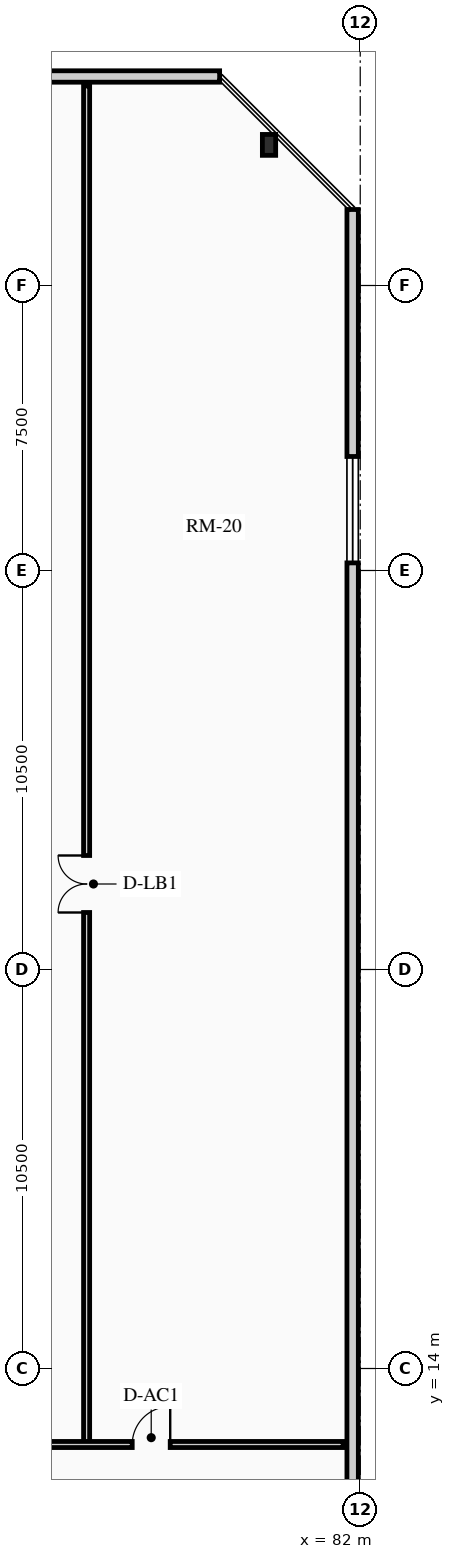
"""IFC4 building model, lengths in metres.
Left out: names, types, materials, properties, quantities, classifications, styles, units other than length and angle.
Written with IfcOpenShell. Run it as: python <this file> out.ifc"""

import sys

from ifc_helpers import new_model, si_unit, direction, frame, frame_2d, origin, origin_2d, place, context, subcontext, project, spatial, rectangle, hollow_rectangle, extrude, source, transform, mapped, element, fill, save


model = new_model("IFC4")
c1 = context("Model", 3, precision=1e-05, world=origin(), true_north=direction((0.0, 1.0)))
c2 = subcontext(c1, "Body", "Model", "MODEL_VIEW")
j1 = project(units=[si_unit("LENGTHUNIT", "METRE"), si_unit("PLANEANGLEUNIT", "RADIAN")], contexts=[c1])
p1 = place(None, origin())
s1 = spatial("IfcSite", under=j1, at=p1, CompositionType="ELEMENT")
p2 = place(p1, origin())
s2 = spatial("IfcBuilding", under=s1, at=p2, CompositionType="ELEMENT")
p3 = place(p2, frame((0.0, 0.0, 4.8)))
s3 = spatial("IfcBuildingStorey", under=s2, at=p3, CompositionType="ELEMENT", Elevation=4.8)
p4 = place(p3, frame((79.6, 46.2, 0.0), z_axis=(0.0, 0.0, 1.0), x_axis=(1.0, 0.0, 0.0)))
e1 = element("IfcColumn", 1, at=p4, inside=s3, PredefinedType="PILASTER", context=c2, shape_type="SweptSolid", body=[
    extrude(hollow_rectangle(XDim=0.35, YDim=0.55, WallThickness=0.022, at=origin_2d()), origin(), (0.0, 0.0, 1.0), 4.2),
])
p5 = place(p3, frame((3.8, 48.0, 0.0), z_axis=(0.0, 0.0, 1.0), x_axis=(1.0, 0.0, 0.0)))
e2 = element("IfcWall", 2, at=p5, inside=s3, PredefinedType="SOLIDWALL", context=c2, shape_type="SweptSolid", body=[
    extrude(rectangle(XDim=74.5, YDim=0.3, at=frame_2d((37.25, 0.0))), origin(), (0.0, 0.0, 1.0), 3.885),
])
m1 = source(origin(), c2, "Body", "SweptSolid", [
    extrude(rectangle(XDim=2.8, YDim=2.1, at=frame_2d((1.4, 1.05))), frame((0.0, 0.16, 0.0), z_axis=(0.0, -1.0, 0.0), x_axis=(1.0, 0.0, 0.0)), (0.0, 0.0, 1.0), 0.32),
])
p6 = place(p5, frame((6.5, 0.0, 0.8)))
e3 = element("IfcOpeningElement", 3, at=p6, cuts=e2, PredefinedType="OPENING", context=c2, shape_type="MappedRepresentation", body=[
    mapped(m1, transform((0.0, 0.0, 0.0), x_axis=(1.0, 0.0, 0.0), y_axis=(0.0, 1.0, 0.0), z_axis=(0.0, 0.0, 1.0), scale=1.0)),
])
p7 = place(p5, frame((39.5, 0.0, 0.8)))
e4 = element("IfcOpeningElement", 4, at=p7, cuts=e2, PredefinedType="OPENING", context=c2, shape_type="MappedRepresentation", body=[
    mapped(m1, transform((0.0, 0.0, 0.0), x_axis=(1.0, 0.0, 0.0), y_axis=(0.0, 1.0, 0.0), z_axis=(0.0, 0.0, 1.0), scale=1.0)),
])
p8 = place(p3, frame((81.8, 44.5, 0.0), z_axis=(0.0, 0.0, 1.0), x_axis=(0.0, -1.0, 0.0)))
e5 = element("IfcWall", 5, at=p8, inside=s3, PredefinedType="SOLIDWALL", context=c2, shape_type="SweptSolid", body=[
    extrude(rectangle(XDim=40.0, YDim=0.3, at=frame_2d((20.0, 0.0))), origin(), (0.0, 0.0, 1.0), 3.885),
])
p9 = place(p8, frame((6.5, 0.0, 0.8)))
e6 = element("IfcOpeningElement", 6, at=p9, cuts=e5, PredefinedType="OPENING", context=c2, shape_type="MappedRepresentation", body=[
    mapped(m1, transform((0.0, 0.0, 0.0), x_axis=(1.0, 0.0, 0.0), y_axis=(0.0, 1.0, 0.0), z_axis=(0.0, 0.0, 1.0), scale=1.0)),
])
p10 = place(p3, frame((74.8, 12.0, 0.0), z_axis=(0.0, 0.0, 1.0), x_axis=(0.0, 1.0, 0.0)))
e7 = element("IfcWall", 7, at=p10, inside=s3, PredefinedType="PARTITIONING", context=c2, shape_type="SweptSolid", body=[
    extrude(rectangle(XDim=35.75, YDim=0.16, at=frame_2d((17.875, 0.0))), origin(), (0.0, 0.0, 1.0), 2.929),
])
m2 = source(origin(), c2, "Body", "SweptSolid", [
    extrude(rectangle(XDim=1.5, YDim=2.02, at=frame_2d((0.75, 1.01))), frame((0.0, 0.09, 0.0), z_axis=(0.0, -1.0, 0.0), x_axis=(1.0, 0.0, 0.0)), (0.0, 0.0, 1.0), 0.18),
])
p11 = place(p10, frame((14.0, 0.0, 0.0)))
e8 = element("IfcOpeningElement", 8, at=p11, cuts=e7, PredefinedType="OPENING", context=c2, shape_type="MappedRepresentation", body=[
    mapped(m2, transform((0.0, 0.0, 0.0), x_axis=(1.0, 0.0, 0.0), y_axis=(0.0, 1.0, 0.0), z_axis=(0.0, 0.0, 1.0), scale=1.0)),
])
p12 = place(p3, frame((32.5, 12.0, 0.0), z_axis=(0.0, 0.0, 1.0), x_axis=(1.0, 0.0, 0.0)))
e9 = element("IfcWall", 9, at=p12, inside=s3, PredefinedType="PARTITIONING", context=c2, shape_type="SweptSolid", body=[
    extrude(rectangle(XDim=49.05, YDim=0.16, at=frame_2d((24.525, 0.0))), origin(), (0.0, 0.0, 1.0), 2.929),
])
p13 = place(p12, frame((5.5, 0.0, 0.0)))
e10 = element("IfcOpeningElement", 10, at=p13, cuts=e9, PredefinedType="OPENING", context=c2, shape_type="MappedRepresentation", body=[
    mapped(m2, transform((0.0, 0.0, 0.0), x_axis=(1.0, 0.0, 0.0), y_axis=(0.0, 1.0, 0.0), z_axis=(0.0, 0.0, 1.0), scale=1.0)),
])
m3 = source(origin(), c2, "Body", "SweptSolid", [
    extrude(rectangle(XDim=1.0, YDim=2.015, at=frame_2d((0.5, 1.007))), frame((0.0, 0.09, 0.0), z_axis=(0.0, -1.0, 0.0), x_axis=(1.0, 0.0, 0.0)), (0.0, 0.0, 1.0), 0.18),
])
p14 = place(p12, frame((43.5, 0.0, 0.0)))
e11 = element("IfcOpeningElement", 11, at=p14, cuts=e9, PredefinedType="OPENING", context=c2, shape_type="MappedRepresentation", body=[
    mapped(m3, transform((0.0, 0.0, 0.0), x_axis=(1.0, 0.0, 0.0), y_axis=(0.0, 1.0, 0.0), z_axis=(0.0, 0.0, 1.0), scale=1.0)),
])
m4 = source(origin(), c2, "Body", "SweptSolid", [
    extrude(rectangle(XDim=2.8, YDim=2.1, at=frame_2d((1.4, 1.05))), frame((0.0, 0.03, 0.0), z_axis=(0.0, -1.0, 0.0), x_axis=(1.0, 0.0, 0.0)), (0.0, 0.0, 1.0), 0.06),
])
p15 = place(p9, origin())
e12 = element("IfcWindow", 12, at=p15, inside=s3, PartitioningType="TRIPLE_PANEL_VERTICAL", PredefinedType="WINDOW", context=c2, shape_type="MappedRepresentation", body=[
    mapped(m4, transform((0.0, 0.0, 0.0), x_axis=(1.0, 0.0, 0.0), y_axis=(0.0, 1.0, 0.0), z_axis=(0.0, 0.0, 1.0), scale=1.0)),
])
fill(e6, e12)
m5 = source(origin(), c2, "Body", "SweptSolid", [
    extrude(rectangle(XDim=1.5, YDim=2.02, at=frame_2d((0.75, 1.01))), frame((0.0, 0.025, 0.0), z_axis=(0.0, -1.0, 0.0), x_axis=(1.0, 0.0, 0.0)), (0.0, 0.0, 1.0), 0.05),
])
p16 = place(p11, origin())
e13 = element("IfcDoor", 13, at=p16, inside=s3, OperationType="DOUBLE_DOOR_SINGLE_SWING", PredefinedType="DOOR", context=c2, shape_type="MappedRepresentation", body=[
    mapped(m5, transform((0.0, 0.0, 0.0), x_axis=(1.0, 0.0, 0.0), y_axis=(0.0, 1.0, 0.0), z_axis=(0.0, 0.0, 1.0), scale=1.0)),
])
fill(e8, e13)
m6 = source(origin(), c2, "Body", "SweptSolid", [
    extrude(rectangle(XDim=1.0, YDim=2.015, at=frame_2d((0.5, 1.007))), frame((0.0, 0.025, 0.0), z_axis=(0.0, -1.0, 0.0), x_axis=(1.0, 0.0, 0.0)), (0.0, 0.0, 1.0), 0.05),
])
p17 = place(p14, origin())
e14 = element("IfcDoor", 14, at=p17, inside=s3, OperationType="SINGLE_SWING_RIGHT", PredefinedType="DOOR", context=c2, shape_type="MappedRepresentation", body=[
    mapped(m6, transform((0.0, 0.0, 0.0), x_axis=(1.0, 0.0, 0.0), y_axis=(0.0, 1.0, 0.0), z_axis=(0.0, 0.0, 1.0), scale=1.0)),
])
fill(e11, e14)
save(model, sys.argv[1])
